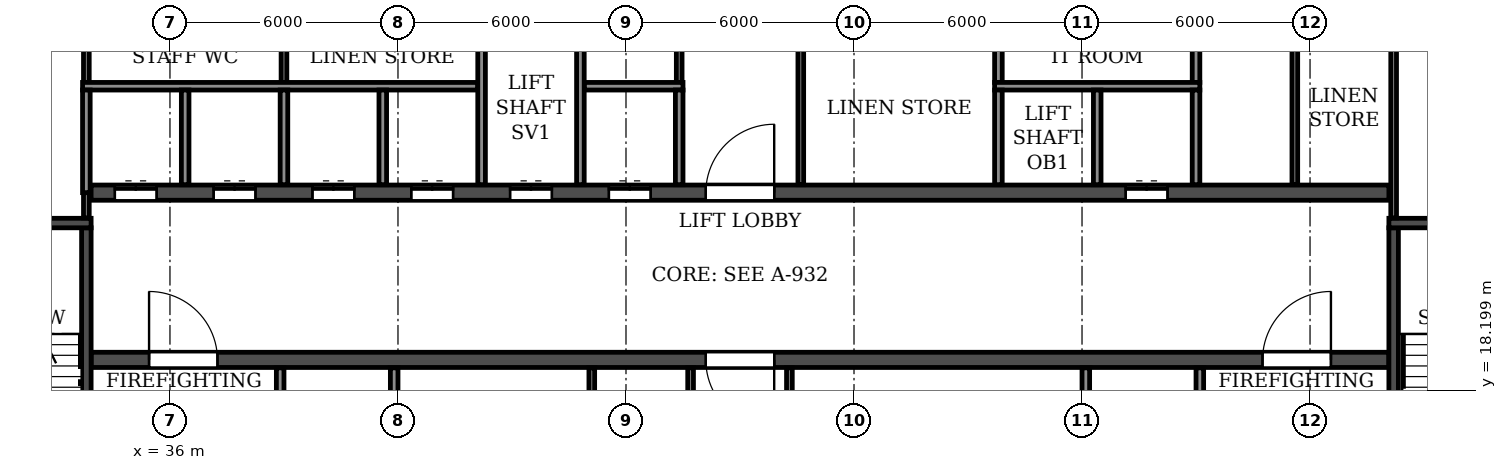
"""IFC4 building model, lengths in metres.
Left out: names, types, materials, properties, quantities, classifications, styles, units other than length and angle.
Written with IfcOpenShell. Run it as: python <this file> out.ifc"""

import sys

from ifc_helpers import new_model, si_unit, direction, frame, frame_2d, origin, place, context, subcontext, project, spatial, rectangle, extrude, element, fill, save


model = new_model("IFC4")
c1 = context("Model", 3, precision=1e-05, world=origin(), true_north=direction((0.0, 1.0)))
c2 = subcontext(c1, "Body", "Model", "MODEL_VIEW")
j1 = project(units=[si_unit("LENGTHUNIT", "METRE"), si_unit("PLANEANGLEUNIT", "RADIAN")], contexts=[c1])
p1 = place(None, origin())
s1 = spatial("IfcSite", under=j1, at=p1, CompositionType="ELEMENT")
p2 = place(p1, origin())
s2 = spatial("IfcBuilding", under=s1, at=p2, CompositionType="ELEMENT")
p3 = place(p2, frame((0.0, 0.0, 171.9)))
s3 = spatial("IfcBuildingStorey", under=s2, at=p3, CompositionType="ELEMENT", Elevation=171.9)
p4 = place(p3, frame((33.925, 19.0, 0.0), z_axis=(0.0, 0.0, 1.0), x_axis=(1.0, 0.0, 0.0)))
e1 = element("IfcWall", 1, at=p4, inside=s3, PredefinedType="SOLIDWALL", context=c2, shape_type="SweptSolid", body=[
    extrude(rectangle(XDim=34.15, YDim=0.4, at=frame_2d((17.075, 0.0))), origin(), (0.0, 0.0, 1.0), 3.08),
])
p5 = place(p4, frame((16.175, 0.0, 0.0)))
e2 = element("IfcOpeningElement", 2, at=p5, cuts=e1, PredefinedType="OPENING", context=c2, shape_type="SweptSolid", body=[
    extrude(rectangle(XDim=1.8, YDim=2.1, at=frame_2d((0.9, 1.05))), frame((0.0, 0.21, 0.0), z_axis=(0.0, -1.0, 0.0), x_axis=(1.0, 0.0, 0.0)), (0.0, 0.0, 1.0), 0.42),
])
p6 = place(p4, frame((1.525, 0.0, 0.0)))
e3 = element("IfcOpeningElement", 3, at=p6, cuts=e1, PredefinedType="OPENING", context=c2, shape_type="SweptSolid", body=[
    extrude(rectangle(XDim=1.8, YDim=2.1, at=frame_2d((0.9, 1.05))), frame((0.0, 0.21, 0.0), z_axis=(0.0, -1.0, 0.0), x_axis=(1.0, 0.0, 0.0)), (0.0, 0.0, 1.0), 0.42),
])
p7 = place(p4, frame((30.825, 0.0, 0.0)))
e4 = element("IfcOpeningElement", 4, at=p7, cuts=e1, PredefinedType="OPENING", context=c2, shape_type="SweptSolid", body=[
    extrude(rectangle(XDim=1.8, YDim=2.1, at=frame_2d((0.9, 1.05))), frame((0.0, 0.21, 0.0), z_axis=(0.0, -1.0, 0.0), x_axis=(1.0, 0.0, 0.0)), (0.0, 0.0, 1.0), 0.42),
])
p8 = place(p3, frame((33.925, 23.4, 0.0), z_axis=(0.0, 0.0, 1.0), x_axis=(1.0, 0.0, 0.0)))
e5 = element("IfcWall", 5, at=p8, inside=s3, PredefinedType="SOLIDWALL", context=c2, shape_type="SweptSolid", body=[
    extrude(rectangle(XDim=34.15, YDim=0.4, at=frame_2d((17.075, 0.0))), origin(), (0.0, 0.0, 1.0), 3.08),
])
p9 = place(p8, frame((16.175, 0.0, 0.0)))
e6 = element("IfcOpeningElement", 6, at=p9, cuts=e5, PredefinedType="OPENING", context=c2, shape_type="SweptSolid", body=[
    extrude(rectangle(XDim=1.8, YDim=2.1, at=frame_2d((0.9, 1.05))), frame((0.0, 0.21, 0.0), z_axis=(0.0, -1.0, 0.0), x_axis=(1.0, 0.0, 0.0)), (0.0, 0.0, 1.0), 0.42),
])
p10 = place(p8, frame((0.625, 0.0, 0.0)))
e7 = element("IfcOpeningElement", 7, at=p10, cuts=e5, PredefinedType="OPENING", context=c2, shape_type="SweptSolid", body=[
    extrude(rectangle(XDim=1.1, YDim=2.1, at=frame_2d((0.55, 1.05))), frame((0.0, 0.21, 0.0), z_axis=(0.0, -1.0, 0.0), x_axis=(1.0, 0.0, 0.0)), (0.0, 0.0, 1.0), 0.42),
])
p11 = place(p8, frame((3.225, 0.0, 0.0)))
e8 = element("IfcOpeningElement", 8, at=p11, cuts=e5, PredefinedType="OPENING", context=c2, shape_type="SweptSolid", body=[
    extrude(rectangle(XDim=1.1, YDim=2.1, at=frame_2d((0.55, 1.05))), frame((0.0, 0.21, 0.0), z_axis=(0.0, -1.0, 0.0), x_axis=(1.0, 0.0, 0.0)), (0.0, 0.0, 1.0), 0.42),
])
p12 = place(p8, frame((5.825, 0.0, 0.0)))
e9 = element("IfcOpeningElement", 9, at=p12, cuts=e5, PredefinedType="OPENING", context=c2, shape_type="SweptSolid", body=[
    extrude(rectangle(XDim=1.1, YDim=2.1, at=frame_2d((0.55, 1.05))), frame((0.0, 0.21, 0.0), z_axis=(0.0, -1.0, 0.0), x_axis=(1.0, 0.0, 0.0)), (0.0, 0.0, 1.0), 0.42),
])
p13 = place(p8, frame((8.425, 0.0, 0.0)))
e10 = element("IfcOpeningElement", 10, at=p13, cuts=e5, PredefinedType="OPENING", context=c2, shape_type="SweptSolid", body=[
    extrude(rectangle(XDim=1.1, YDim=2.1, at=frame_2d((0.55, 1.05))), frame((0.0, 0.21, 0.0), z_axis=(0.0, -1.0, 0.0), x_axis=(1.0, 0.0, 0.0)), (0.0, 0.0, 1.0), 0.42),
])
p14 = place(p8, frame((11.025, 0.0, 0.0)))
e11 = element("IfcOpeningElement", 11, at=p14, cuts=e5, PredefinedType="OPENING", context=c2, shape_type="SweptSolid", body=[
    extrude(rectangle(XDim=1.1, YDim=2.1, at=frame_2d((0.55, 1.05))), frame((0.0, 0.21, 0.0), z_axis=(0.0, -1.0, 0.0), x_axis=(1.0, 0.0, 0.0)), (0.0, 0.0, 1.0), 0.42),
])
p15 = place(p8, frame((13.625, 0.0, 0.0)))
e12 = element("IfcOpeningElement", 12, at=p15, cuts=e5, PredefinedType="OPENING", context=c2, shape_type="SweptSolid", body=[
    extrude(rectangle(XDim=1.1, YDim=2.1, at=frame_2d((0.55, 1.05))), frame((0.0, 0.21, 0.0), z_axis=(0.0, -1.0, 0.0), x_axis=(1.0, 0.0, 0.0)), (0.0, 0.0, 1.0), 0.42),
])
p16 = place(p8, frame((27.225, 0.0, 0.0)))
e13 = element("IfcOpeningElement", 13, at=p16, cuts=e5, PredefinedType="OPENING", context=c2, shape_type="SweptSolid", body=[
    extrude(rectangle(XDim=1.1, YDim=2.1, at=frame_2d((0.55, 1.05))), frame((0.0, 0.21, 0.0), z_axis=(0.0, -1.0, 0.0), x_axis=(1.0, 0.0, 0.0)), (0.0, 0.0, 1.0), 0.42),
])
p17 = place(p3, frame((33.8, 14.8, 0.0), z_axis=(0.0, 0.0, 1.0), x_axis=(0.0, 1.0, 0.0)))
e14 = element("IfcWall", 14, at=p17, inside=s3, PredefinedType="SOLIDWALL", context=c2, shape_type="SweptSolid", body=[
    extrude(rectangle(XDim=7.675, YDim=0.25, at=frame_2d((3.837, 0.0))), origin(), (0.0, 0.0, 1.0), 3.08),
])
p18 = place(p17, frame((0.5, 0.0, 0.0)))
e15 = element("IfcOpeningElement", 15, at=p18, cuts=e14, PredefinedType="OPENING", context=c2, shape_type="SweptSolid", body=[
    extrude(rectangle(XDim=1.0, YDim=2.1, at=frame_2d((0.5, 1.05))), frame((0.0, 0.135, 0.0), z_axis=(0.0, -1.0, 0.0), x_axis=(1.0, 0.0, 0.0)), (0.0, 0.0, 1.0), 0.27),
])
p19 = place(p3, frame((29.875, 22.6, 0.0), z_axis=(0.0, 0.0, 1.0), x_axis=(1.0, 0.0, 0.0)))
e16 = element("IfcWall", 16, at=p19, inside=s3, PredefinedType="SOLIDWALL", context=c2, shape_type="SweptSolid", body=[
    extrude(rectangle(XDim=4.05, YDim=0.25, at=frame_2d((2.025, 0.0))), origin(), (0.0, 0.0, 1.0), 3.08),
])
p20 = place(p3, frame((68.2, 14.8, 0.0), z_axis=(0.0, 0.0, 1.0), x_axis=(0.0, 1.0, 0.0)))
e17 = element("IfcWall", 17, at=p20, inside=s3, PredefinedType="SOLIDWALL", context=c2, shape_type="SweptSolid", body=[
    extrude(rectangle(XDim=7.675, YDim=0.25, at=frame_2d((3.837, 0.0))), origin(), (0.0, 0.0, 1.0), 3.08),
])
p21 = place(p20, frame((0.5, 0.0, 0.0)))
e18 = element("IfcOpeningElement", 18, at=p21, cuts=e17, PredefinedType="OPENING", context=c2, shape_type="SweptSolid", body=[
    extrude(rectangle(XDim=1.0, YDim=2.1, at=frame_2d((0.5, 1.05))), frame((0.0, 0.135, 0.0), z_axis=(0.0, -1.0, 0.0), x_axis=(1.0, 0.0, 0.0)), (0.0, 0.0, 1.0), 0.27),
])
p22 = place(p3, frame((68.075, 22.6, 0.0), z_axis=(0.0, 0.0, 1.0), x_axis=(1.0, 0.0, 0.0)))
e19 = element("IfcWall", 19, at=p22, inside=s3, PredefinedType="SOLIDWALL", context=c2, shape_type="SweptSolid", body=[
    extrude(rectangle(XDim=4.05, YDim=0.25, at=frame_2d((2.025, 0.0))), origin(), (0.0, 0.0, 1.0), 3.08),
])
p23 = place(p3, frame((49.4, 26.3, 0.0), z_axis=(0.0, 0.0, 1.0), x_axis=(0.0, 1.0, 0.0)))
e20 = element("IfcWall", 20, at=p23, inside=s3, PredefinedType="PARTITIONING", context=c2, shape_type="SweptSolid", body=[
    extrude(rectangle(XDim=1.29, YDim=0.15, at=frame_2d((0.645, 0.0))), origin(), (0.0, 0.0, 1.0), 3.08),
])
for number, where, z_axis, x_axis in (
    (21, (49.7, 14.81, 0.0), (0.0, 0.0, 1.0), (0.0, 1.0, 0.0)),
    (22, (52.3, 14.81, 0.0), (0.0, 0.0, 1.0), (0.0, 1.0, 0.0)),
    (23, (52.6, 23.61, 0.0), (0.0, 0.0, 1.0), (0.0, 1.0, 0.0)),
):
    element("IfcWall", number, at=place(p3, frame(where, z_axis=z_axis, x_axis=x_axis)), inside=s3, PredefinedType="PARTITIONING", context=c2, shape_type="SweptSolid", body=[
        extrude(rectangle(XDim=3.98, YDim=0.15, at=frame_2d((1.99, 0.0))), origin(), (0.0, 0.0, 1.0), 3.08),
    ])
p24 = place(p3, frame((39.0, 26.3, 0.0), z_axis=(0.0, 0.0, 1.0), x_axis=(0.0, 1.0, 0.0)))
e24 = element("IfcWall", 24, at=p24, inside=s3, PredefinedType="PARTITIONING", context=c2, shape_type="SweptSolid", body=[
    extrude(rectangle(XDim=1.29, YDim=0.15, at=frame_2d((0.645, 0.0))), origin(), (0.0, 0.0, 1.0), 3.08),
])
for number, where, z_axis, x_axis in (
    (25, (47.1, 14.81, 0.0), (0.0, 0.0, 1.0), (0.0, 1.0, 0.0)),
    (26, (65.6, 23.61, 0.0), (0.0, 0.0, 1.0), (0.0, 1.0, 0.0)),
):
    element("IfcWall", number, at=place(p3, frame(where, z_axis=z_axis, x_axis=x_axis)), inside=s3, PredefinedType="PARTITIONING", context=c2, shape_type="SweptSolid", body=[
        extrude(rectangle(XDim=3.98, YDim=0.15, at=frame_2d((1.99, 0.0))), origin(), (0.0, 0.0, 1.0), 3.08),
    ])
for number, where, z_axis, x_axis in (
    (27, (57.8, 26.3, 0.0), (0.0, 0.0, 1.0), (0.0, 1.0, 0.0)),
    (28, (63.0, 26.3, 0.0), (0.0, 0.0, 1.0), (0.0, 1.0, 0.0)),
):
    element("IfcWall", number, at=place(p3, frame(where, z_axis=z_axis, x_axis=x_axis)), inside=s3, PredefinedType="PARTITIONING", context=c2, shape_type="SweptSolid", body=[
        extrude(rectangle(XDim=1.29, YDim=0.2, at=frame_2d((0.645, 0.0))), origin(), (0.0, 0.0, 1.0), 3.08),
    ])
p25 = place(p3, frame((33.8, 22.735, 0.0), z_axis=(0.0, 0.0, 1.0), x_axis=(0.0, 1.0, 0.0)))
e29 = element("IfcWall", 29, at=p25, inside=s3, PredefinedType="PARTITIONING", context=c2, shape_type="SweptSolid", body=[
    extrude(rectangle(XDim=0.665, YDim=0.15, at=frame_2d((0.333, 0.0))), origin(), (0.0, 0.0, 1.0), 3.08),
])
p26 = place(p3, frame((33.8, 26.3, 0.0), z_axis=(0.0, 0.0, 1.0), x_axis=(0.0, 1.0, 0.0)))
e30 = element("IfcWall", 30, at=p26, inside=s3, PredefinedType="PARTITIONING", context=c2, shape_type="SweptSolid", body=[
    extrude(rectangle(XDim=1.29, YDim=0.15, at=frame_2d((0.645, 0.0))), origin(), (0.0, 0.0, 1.0), 3.08),
])
p27 = place(p3, frame((68.2, 22.735, 0.0), z_axis=(0.0, 0.0, 1.0), x_axis=(0.0, 1.0, 0.0)))
e31 = element("IfcWall", 31, at=p27, inside=s3, PredefinedType="PARTITIONING", context=c2, shape_type="SweptSolid", body=[
    extrude(rectangle(XDim=4.855, YDim=0.15, at=frame_2d((2.427, 0.0))), origin(), (0.0, 0.0, 1.0), 3.08),
])
p28 = place(p3, frame((33.7, 26.2, 0.0), z_axis=(0.0, 0.0, 1.0), x_axis=(1.0, 0.0, 0.0)))
e32 = element("IfcWall", 32, at=p28, inside=s3, PredefinedType="PARTITIONING", context=c2, shape_type="SweptSolid", body=[
    extrude(rectangle(XDim=10.4, YDim=0.2, at=frame_2d((5.2, 0.0))), origin(), (0.0, 0.0, 1.0), 3.08),
])
p29 = place(p3, frame((46.9, 26.2, 0.0), z_axis=(0.0, 0.0, 1.0), x_axis=(1.0, 0.0, 0.0)))
e33 = element("IfcWall", 33, at=p29, inside=s3, PredefinedType="PARTITIONING", context=c2, shape_type="SweptSolid", body=[
    extrude(rectangle(XDim=2.6, YDim=0.2, at=frame_2d((1.3, 0.0))), origin(), (0.0, 0.0, 1.0), 3.08),
])
p30 = place(p3, frame((57.7, 26.2, 0.0), z_axis=(0.0, 0.0, 1.0), x_axis=(1.0, 0.0, 0.0)))
e34 = element("IfcWall", 34, at=p30, inside=s3, PredefinedType="PARTITIONING", context=c2, shape_type="SweptSolid", body=[
    extrude(rectangle(XDim=5.4, YDim=0.2, at=frame_2d((2.7, 0.0))), origin(), (0.0, 0.0, 1.0), 3.08),
])
p31 = place(p3, frame((33.8, 23.4, 0.0), z_axis=(0.0, 0.0, 1.0), x_axis=(0.0, 1.0, 0.0)))
e35 = element("IfcWall", 35, at=p31, inside=s3, PredefinedType="PARTITIONING", context=c2, shape_type="SweptSolid", body=[
    extrude(rectangle(XDim=2.7, YDim=0.2, at=frame_2d((1.35, 0.0))), origin(), (0.0, 0.0, 1.0), 3.08),
])
p32 = place(p3, frame((36.4, 23.61, 0.0), z_axis=(0.0, 0.0, 1.0), x_axis=(0.0, 1.0, 0.0)))
e36 = element("IfcWall", 36, at=p32, inside=s3, PredefinedType="PARTITIONING", context=c2, shape_type="SweptSolid", body=[
    extrude(rectangle(XDim=2.49, YDim=0.2, at=frame_2d((1.245, 0.0))), origin(), (0.0, 0.0, 1.0), 3.08),
])
p33 = place(p3, frame((38.9, 14.81, 0.0), z_axis=(0.0, 0.0, 1.0), x_axis=(0.0, 1.0, 0.0)))
e37 = element("IfcWall", 37, at=p33, inside=s3, PredefinedType="PARTITIONING", context=c2, shape_type="SweptSolid", body=[
    extrude(rectangle(XDim=3.98, YDim=0.2, at=frame_2d((1.99, 0.0))), origin(), (0.0, 0.0, 1.0), 3.08),
])
p34 = place(p33, frame((1.44, 0.0, 0.0)))
e38 = element("IfcOpeningElement", 38, at=p34, cuts=e37, PredefinedType="OPENING", context=c2, shape_type="SweptSolid", body=[
    extrude(rectangle(XDim=1.1, YDim=2.1, at=frame_2d((0.55, 1.05))), frame((0.0, 0.11, 0.0), z_axis=(0.0, -1.0, 0.0), x_axis=(1.0, 0.0, 0.0)), (0.0, 0.0, 1.0), 0.22),
])
for number, where, z_axis, x_axis in (
    (39, (39.0, 23.61, 0.0), (0.0, 0.0, 1.0), (0.0, 1.0, 0.0)),
    (40, (41.6, 23.61, 0.0), (0.0, 0.0, 1.0), (0.0, 1.0, 0.0)),
):
    element("IfcWall", number, at=place(p3, frame(where, z_axis=z_axis, x_axis=x_axis)), inside=s3, PredefinedType="PARTITIONING", context=c2, shape_type="SweptSolid", body=[
        extrude(rectangle(XDim=2.49, YDim=0.2, at=frame_2d((1.245, 0.0))), origin(), (0.0, 0.0, 1.0), 3.08),
    ])
for number, where, z_axis, x_axis in (
    (41, (41.9, 14.81, 0.0), (0.0, 0.0, 1.0), (0.0, 1.0, 0.0)),
    (42, (44.2, 23.61, 0.0), (0.0, 0.0, 1.0), (0.0, 1.0, 0.0)),
    (43, (46.8, 23.61, 0.0), (0.0, 0.0, 1.0), (0.0, 1.0, 0.0)),
):
    element("IfcWall", number, at=place(p3, frame(where, z_axis=z_axis, x_axis=x_axis)), inside=s3, PredefinedType="PARTITIONING", context=c2, shape_type="SweptSolid", body=[
        extrude(rectangle(XDim=3.98, YDim=0.2, at=frame_2d((1.99, 0.0))), origin(), (0.0, 0.0, 1.0), 3.08),
    ])
for number, where, z_axis, x_axis in (
    (44, (49.4, 23.61, 0.0), (0.0, 0.0, 1.0), (0.0, 1.0, 0.0)),
    (45, (57.8, 23.61, 0.0), (0.0, 0.0, 1.0), (0.0, 1.0, 0.0)),
):
    element("IfcWall", number, at=place(p3, frame(where, z_axis=z_axis, x_axis=x_axis)), inside=s3, PredefinedType="PARTITIONING", context=c2, shape_type="SweptSolid", body=[
        extrude(rectangle(XDim=2.49, YDim=0.2, at=frame_2d((1.245, 0.0))), origin(), (0.0, 0.0, 1.0), 3.08),
    ])
p35 = place(p3, frame((60.1, 14.81, 0.0), z_axis=(0.0, 0.0, 1.0), x_axis=(0.0, 1.0, 0.0)))
e46 = element("IfcWall", 46, at=p35, inside=s3, PredefinedType="PARTITIONING", context=c2, shape_type="SweptSolid", body=[
    extrude(rectangle(XDim=3.98, YDim=0.2, at=frame_2d((1.99, 0.0))), origin(), (0.0, 0.0, 1.0), 3.08),
])
for number, where, z_axis, x_axis in (
    (47, (60.4, 23.61, 0.0), (0.0, 0.0, 1.0), (0.0, 1.0, 0.0)),
    (48, (63.0, 23.61, 0.0), (0.0, 0.0, 1.0), (0.0, 1.0, 0.0)),
):
    element("IfcWall", number, at=place(p3, frame(where, z_axis=z_axis, x_axis=x_axis)), inside=s3, PredefinedType="PARTITIONING", context=c2, shape_type="SweptSolid", body=[
        extrude(rectangle(XDim=2.49, YDim=0.2, at=frame_2d((1.245, 0.0))), origin(), (0.0, 0.0, 1.0), 3.08),
    ])
p36 = place(p3, frame((63.1, 14.81, 0.0), z_axis=(0.0, 0.0, 1.0), x_axis=(0.0, 1.0, 0.0)))
e49 = element("IfcWall", 49, at=p36, inside=s3, PredefinedType="PARTITIONING", context=c2, shape_type="SweptSolid", body=[
    extrude(rectangle(XDim=3.98, YDim=0.2, at=frame_2d((1.99, 0.0))), origin(), (0.0, 0.0, 1.0), 3.08),
])
p37 = place(p36, frame((1.44, 0.0, 0.0)))
e50 = element("IfcOpeningElement", 50, at=p37, cuts=e49, PredefinedType="OPENING", context=c2, shape_type="SweptSolid", body=[
    extrude(rectangle(XDim=1.1, YDim=2.1, at=frame_2d((0.55, 1.05))), frame((0.0, 0.11, 0.0), z_axis=(0.0, -1.0, 0.0), x_axis=(1.0, 0.0, 0.0)), (0.0, 0.0, 1.0), 0.22),
])
p38 = place(p9, origin())
e51 = element("IfcDoor", 51, at=p38, inside=s3, OperationType="DOUBLE_DOOR_SINGLE_SWING", PredefinedType="DOOR", context=c2, shape_type="SweptSolid", body=[
    extrude(rectangle(XDim=1.8, YDim=2.1, at=frame_2d((0.9, 1.05))), frame((0.0, 0.025, 0.0), z_axis=(0.0, -1.0, 0.0), x_axis=(1.0, 0.0, 0.0)), (0.0, 0.0, 1.0), 0.05),
])
fill(e6, e51)
p39 = place(p5, frame((1.8, 0.0, 0.0), z_axis=(0.0, 0.0, 1.0), x_axis=(-1.0, 0.0, 0.0)))
e52 = element("IfcDoor", 52, at=p39, inside=s3, OperationType="DOUBLE_DOOR_SINGLE_SWING", PredefinedType="DOOR", context=c2, shape_type="SweptSolid", body=[
    extrude(rectangle(XDim=1.8, YDim=2.1, at=frame_2d((0.9, 1.05))), frame((0.0, 0.025, 0.0), z_axis=(0.0, -1.0, 0.0), x_axis=(1.0, 0.0, 0.0)), (0.0, 0.0, 1.0), 0.05),
])
fill(e2, e52)
p40 = place(p10, origin())
e53 = element("IfcDoor", 53, at=p40, inside=s3, OperationType="DOUBLE_DOOR_SLIDING", PredefinedType="DOOR", context=c2, shape_type="SweptSolid", body=[
    extrude(rectangle(XDim=1.1, YDim=2.1, at=frame_2d((0.55, 1.05))), frame((0.0, 0.025, 0.0), z_axis=(0.0, -1.0, 0.0), x_axis=(1.0, 0.0, 0.0)), (0.0, 0.0, 1.0), 0.05),
])
fill(e7, e53)
p41 = place(p6, origin())
e54 = element("IfcDoor", 54, at=p41, inside=s3, OperationType="DOUBLE_DOOR_SINGLE_SWING", PredefinedType="DOOR", context=c2, shape_type="SweptSolid", body=[
    extrude(rectangle(XDim=1.8, YDim=2.1, at=frame_2d((0.9, 1.05))), frame((0.0, 0.025, 0.0), z_axis=(0.0, -1.0, 0.0), x_axis=(1.0, 0.0, 0.0)), (0.0, 0.0, 1.0), 0.05),
])
fill(e3, e54)
p42 = place(p11, origin())
e55 = element("IfcDoor", 55, at=p42, inside=s3, OperationType="DOUBLE_DOOR_SLIDING", PredefinedType="DOOR", context=c2, shape_type="SweptSolid", body=[
    extrude(rectangle(XDim=1.1, YDim=2.1, at=frame_2d((0.55, 1.05))), frame((0.0, 0.025, 0.0), z_axis=(0.0, -1.0, 0.0), x_axis=(1.0, 0.0, 0.0)), (0.0, 0.0, 1.0), 0.05),
])
fill(e8, e55)
p43 = place(p12, origin())
e56 = element("IfcDoor", 56, at=p43, inside=s3, OperationType="DOUBLE_DOOR_SLIDING", PredefinedType="DOOR", context=c2, shape_type="SweptSolid", body=[
    extrude(rectangle(XDim=1.1, YDim=2.1, at=frame_2d((0.55, 1.05))), frame((0.0, 0.025, 0.0), z_axis=(0.0, -1.0, 0.0), x_axis=(1.0, 0.0, 0.0)), (0.0, 0.0, 1.0), 0.05),
])
fill(e9, e56)
p44 = place(p13, origin())
e57 = element("IfcDoor", 57, at=p44, inside=s3, OperationType="DOUBLE_DOOR_SLIDING", PredefinedType="DOOR", context=c2, shape_type="SweptSolid", body=[
    extrude(rectangle(XDim=1.1, YDim=2.1, at=frame_2d((0.55, 1.05))), frame((0.0, 0.025, 0.0), z_axis=(0.0, -1.0, 0.0), x_axis=(1.0, 0.0, 0.0)), (0.0, 0.0, 1.0), 0.05),
])
fill(e10, e57)
p45 = place(p14, origin())
e58 = element("IfcDoor", 58, at=p45, inside=s3, OperationType="DOUBLE_DOOR_SLIDING", PredefinedType="DOOR", context=c2, shape_type="SweptSolid", body=[
    extrude(rectangle(XDim=1.1, YDim=2.1, at=frame_2d((0.55, 1.05))), frame((0.0, 0.025, 0.0), z_axis=(0.0, -1.0, 0.0), x_axis=(1.0, 0.0, 0.0)), (0.0, 0.0, 1.0), 0.05),
])
fill(e11, e58)
p46 = place(p15, origin())
e59 = element("IfcDoor", 59, at=p46, inside=s3, OperationType="DOUBLE_DOOR_SLIDING", PredefinedType="DOOR", context=c2, shape_type="SweptSolid", body=[
    extrude(rectangle(XDim=1.1, YDim=2.1, at=frame_2d((0.55, 1.05))), frame((0.0, 0.025, 0.0), z_axis=(0.0, -1.0, 0.0), x_axis=(1.0, 0.0, 0.0)), (0.0, 0.0, 1.0), 0.05),
])
fill(e12, e59)
p47 = place(p16, origin())
e60 = element("IfcDoor", 60, at=p47, inside=s3, OperationType="DOUBLE_DOOR_SLIDING", PredefinedType="DOOR", context=c2, shape_type="SweptSolid", body=[
    extrude(rectangle(XDim=1.1, YDim=2.1, at=frame_2d((0.55, 1.05))), frame((0.0, 0.025, 0.0), z_axis=(0.0, -1.0, 0.0), x_axis=(1.0, 0.0, 0.0)), (0.0, 0.0, 1.0), 0.05),
])
fill(e13, e60)
p48 = place(p7, origin())
e61 = element("IfcDoor", 61, at=p48, inside=s3, OperationType="DOUBLE_DOOR_SINGLE_SWING", PredefinedType="DOOR", context=c2, shape_type="SweptSolid", body=[
    extrude(rectangle(XDim=1.8, YDim=2.1, at=frame_2d((0.9, 1.05))), frame((0.0, 0.025, 0.0), z_axis=(0.0, -1.0, 0.0), x_axis=(1.0, 0.0, 0.0)), (0.0, 0.0, 1.0), 0.05),
])
fill(e4, e61)
save(model, sys.argv[1])
